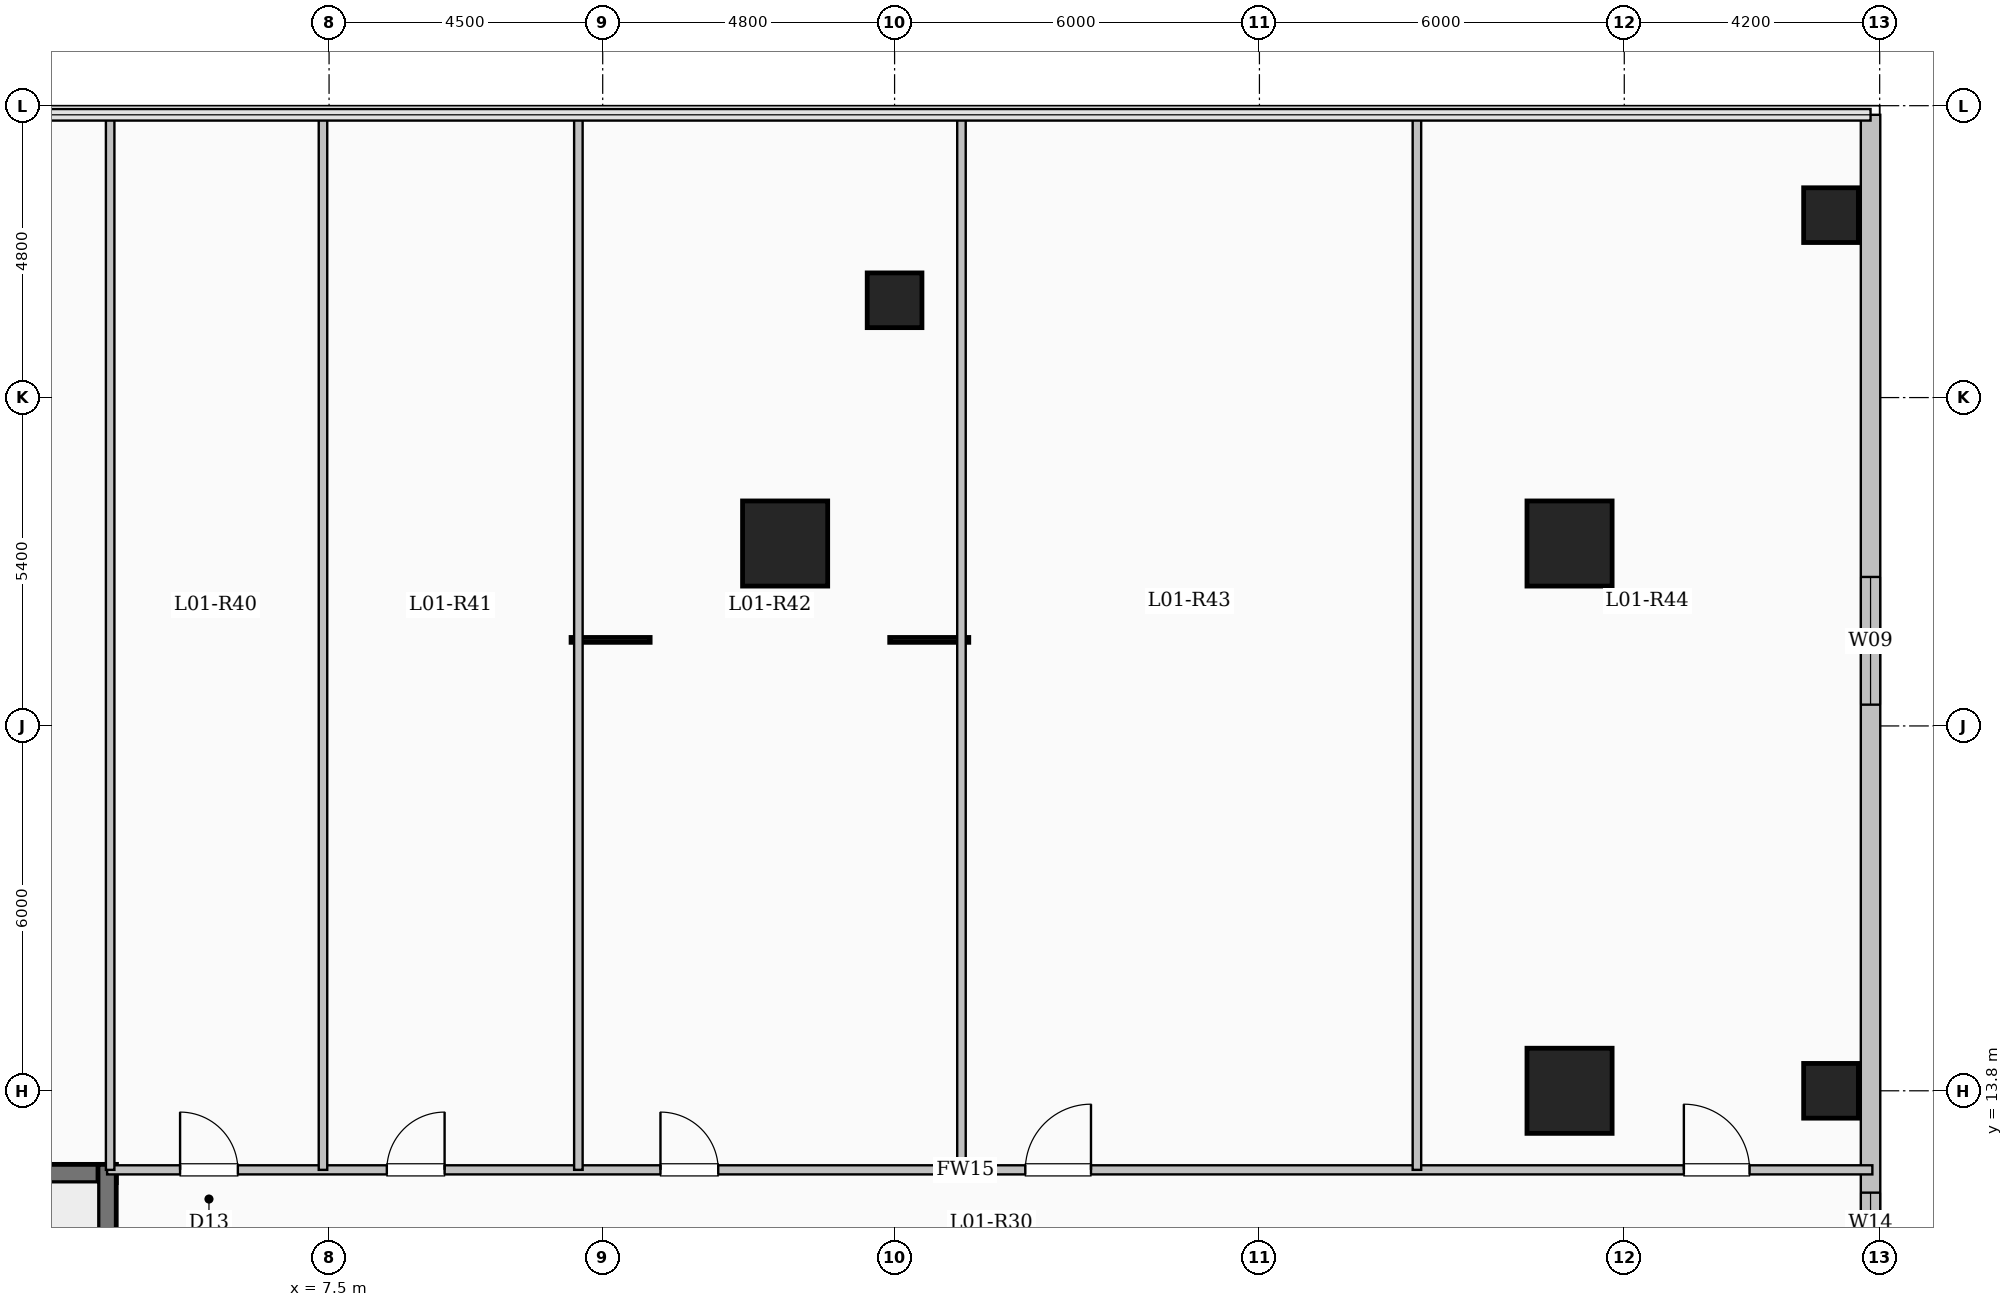
"""IFC4 building model, lengths in metres.
Left out: names, types, materials, properties, quantities, classifications, styles, units other than length and angle.
Written with IfcOpenShell. Run it as: python <this file> out.ifc"""

import sys

from ifc_helpers import new_model, si_unit, direction, frame, frame_2d, origin, origin_2d, place, context, subcontext, project, spatial, rectangle, extrude, element, fill, save


model = new_model("IFC4")
c1 = context("Model", 3, precision=1e-05, world=origin(), true_north=direction((0.0, 1.0)))
c2 = subcontext(c1, "Body", "Model", "MODEL_VIEW")
j1 = project(units=[si_unit("LENGTHUNIT", "METRE"), si_unit("PLANEANGLEUNIT", "RADIAN")], contexts=[c1])
p1 = place(None, origin())
s1 = spatial("IfcSite", under=j1, at=p1, CompositionType="ELEMENT")
p2 = place(p1, origin())
s2 = spatial("IfcBuilding", under=s1, at=p2, CompositionType="ELEMENT")
p3 = place(p2, frame((0.0, 0.0, 5.4)))
s3 = spatial("IfcBuildingStorey", under=s2, at=p3, CompositionType="ELEMENT", Elevation=5.4)
for number, where, z_axis, x_axis in (
    (1, (32.2, 13.8, 0.0), (0.0, 0.0, 1.0), (1.0, 0.0, 0.0)),
    (2, (32.2, 28.2, 0.0), (0.0, 0.0, 1.0), (1.0, 0.0, 0.0)),
):
    element("IfcColumn", number, at=place(p3, frame(where, z_axis=z_axis, x_axis=x_axis)), inside=s3, PredefinedType="COLUMN", context=c2, shape_type="SweptSolid", body=[
        extrude(rectangle(XDim=0.9, YDim=0.9, at=origin_2d()), origin(), (0.0, 0.0, 1.0), 4.28),
    ])
p4 = place(p3, frame((16.8, 26.8, 0.0), z_axis=(0.0, 0.0, 1.0), x_axis=(1.0, 0.0, 0.0)))
e3 = element("IfcColumn", 3, at=p4, inside=s3, PredefinedType="COLUMN", context=c2, shape_type="SweptSolid", body=[
    extrude(rectangle(XDim=0.9, YDim=0.9, at=origin_2d()), origin(), (0.0, 0.0, 1.0), 4.5),
])
for number, where, z_axis, x_axis in (
    (4, (15.0, 22.8, 0.0), (0.0, 0.0, 1.0), (1.0, 0.0, 0.0)),
    (5, (27.9, 22.8, 0.0), (0.0, 0.0, 1.0), (1.0, 0.0, 0.0)),
    (6, (27.9, 13.8, 0.0), (0.0, 0.0, 1.0), (1.0, 0.0, 0.0)),
):
    element("IfcColumn", number, at=place(p3, frame(where, z_axis=z_axis, x_axis=x_axis)), inside=s3, PredefinedType="COLUMN", context=c2, shape_type="SweptSolid", body=[
        extrude(rectangle(XDim=1.4, YDim=1.4, at=origin_2d()), origin(), (0.0, 0.0, 1.0), 4.5),
    ])
p5 = place(p3, frame((32.85, 29.85, 0.0), z_axis=(0.0, 0.0, 1.0), x_axis=(0.0, -1.0, 0.0)))
e7 = element("IfcWall", 7, at=p5, inside=s3, PredefinedType="SOLIDWALL", context=c2, shape_type="SweptSolid", body=[
    extrude(rectangle(XDim=59.7, YDim=0.32, at=frame_2d((29.85, 0.0))), origin(), (0.0, 0.0, 1.0), 4.2),
])
p6 = place(p5, frame((7.6, 0.0, 0.9)))
e8 = element("IfcOpeningElement", 8, at=p6, cuts=e7, PredefinedType="OPENING", context=c2, shape_type="SweptSolid", body=[
    extrude(rectangle(XDim=2.1, YDim=2.0, at=frame_2d((1.05, 1.0))), frame((0.0, 0.17, 0.0), z_axis=(0.0, -1.0, 0.0), x_axis=(1.0, 0.0, 0.0)), (0.0, 0.0, 1.0), 0.34),
])
p7 = place(p5, frame((17.725, 0.0, 0.95)))
e9 = element("IfcOpeningElement", 9, at=p7, cuts=e7, PredefinedType="OPENING", context=c2, shape_type="SweptSolid", body=[
    extrude(rectangle(XDim=1.0, YDim=1.5, at=frame_2d((0.5, 0.75))), frame((0.0, 0.17, 0.0), z_axis=(0.0, -1.0, 0.0), x_axis=(1.0, 0.0, 0.0)), (0.0, 0.0, 1.0), 0.34),
])
p8 = place(p5, frame((27.05, 0.0, 0.9)))
e10 = element("IfcOpeningElement", 10, at=p8, cuts=e7, PredefinedType="OPENING", context=c2, shape_type="SweptSolid", body=[
    extrude(rectangle(XDim=2.1, YDim=2.0, at=frame_2d((1.05, 1.0))), frame((0.0, 0.17, 0.0), z_axis=(0.0, -1.0, 0.0), x_axis=(1.0, 0.0, 0.0)), (0.0, 0.0, 1.0), 0.34),
])
p9 = place(p5, frame((37.758, 0.0, 0.9)))
e11 = element("IfcOpeningElement", 11, at=p9, cuts=e7, PredefinedType="OPENING", context=c2, shape_type="SweptSolid", body=[
    extrude(rectangle(XDim=1.7, YDim=1.9, at=frame_2d((0.85, 0.95))), frame((0.0, 0.17, 0.0), z_axis=(0.0, -1.0, 0.0), x_axis=(1.0, 0.0, 0.0)), (0.0, 0.0, 1.0), 0.34),
])
p10 = place(p3, frame((-4.0, 12.44, 0.0), z_axis=(0.0, 0.0, 1.0), x_axis=(1.0, 0.0, 0.0)))
e12 = element("IfcWall", 12, at=p10, inside=s3, PredefinedType="SHEAR", context=c2, shape_type="SweptSolid", body=[
    extrude(rectangle(XDim=8.0, YDim=0.3, at=frame_2d((4.0, 0.0))), origin(), (0.0, 0.0, 1.0), 4.5),
])
p11 = place(p3, frame((3.85, 9.0, 0.0), z_axis=(0.0, 0.0, 1.0), x_axis=(0.0, 1.0, 0.0)))
e13 = element("IfcWall", 13, at=p11, inside=s3, PredefinedType="SHEAR", context=c2, shape_type="SweptSolid", body=[
    extrude(rectangle(XDim=3.59, YDim=0.3, at=frame_2d((1.795, 0.0))), origin(), (0.0, 0.0, 1.0), 4.5),
])
p12 = place(p3, frame((3.85, 12.5, 0.0), z_axis=(0.0, 0.0, 1.0), x_axis=(1.0, 0.0, 0.0)))
e14 = element("IfcWall", 14, at=p12, inside=s3, PredefinedType="PARTITIONING", context=c2, shape_type="SweptSolid", body=[
    extrude(rectangle(XDim=29.03, YDim=0.15, at=frame_2d((14.515, 0.0))), origin(), (0.0, 0.0, 1.0), 4.2),
])
p13 = place(p12, frame((1.2, 0.0, 0.0)))
e15 = element("IfcOpeningElement", 15, at=p13, cuts=e14, PredefinedType="OPENING", context=c2, shape_type="SweptSolid", body=[
    extrude(rectangle(XDim=0.95, YDim=2.15, at=frame_2d((0.475, 1.075))), frame((0.0, 0.085, 0.0), z_axis=(0.0, -1.0, 0.0), x_axis=(1.0, 0.0, 0.0)), (0.0, 0.0, 1.0), 0.17),
])
p14 = place(p12, frame((4.6, 0.0, 0.0)))
e16 = element("IfcOpeningElement", 16, at=p14, cuts=e14, PredefinedType="OPENING", context=c2, shape_type="SweptSolid", body=[
    extrude(rectangle(XDim=0.95, YDim=2.15, at=frame_2d((0.475, 1.075))), frame((0.0, 0.085, 0.0), z_axis=(0.0, -1.0, 0.0), x_axis=(1.0, 0.0, 0.0)), (0.0, 0.0, 1.0), 0.17),
])
p15 = place(p12, frame((9.1, 0.0, 0.0)))
e17 = element("IfcOpeningElement", 17, at=p15, cuts=e14, PredefinedType="OPENING", context=c2, shape_type="SweptSolid", body=[
    extrude(rectangle(XDim=0.95, YDim=2.15, at=frame_2d((0.475, 1.075))), frame((0.0, 0.085, 0.0), z_axis=(0.0, -1.0, 0.0), x_axis=(1.0, 0.0, 0.0)), (0.0, 0.0, 1.0), 0.17),
])
p16 = place(p12, frame((15.1, 0.0, 0.0)))
e18 = element("IfcOpeningElement", 18, at=p16, cuts=e14, PredefinedType="OPENING", context=c2, shape_type="SweptSolid", body=[
    extrude(rectangle(XDim=1.08, YDim=2.15, at=frame_2d((0.54, 1.075))), frame((0.0, 0.085, 0.0), z_axis=(0.0, -1.0, 0.0), x_axis=(1.0, 0.0, 0.0)), (0.0, 0.0, 1.0), 0.17),
])
p17 = place(p12, frame((25.93, 0.0, 0.0)))
e19 = element("IfcOpeningElement", 19, at=p17, cuts=e14, PredefinedType="OPENING", context=c2, shape_type="SweptSolid", body=[
    extrude(rectangle(XDim=1.08, YDim=2.15, at=frame_2d((0.54, 1.075))), frame((0.0, 0.085, 0.0), z_axis=(0.0, -1.0, 0.0), x_axis=(1.0, 0.0, 0.0)), (0.0, 0.0, 1.0), 0.17),
])
for number, where, z_axis, x_axis in (
    (20, (3.9, 12.5, 0.0), (0.0, 0.0, 1.0), (0.0, 1.0, 0.0)),
    (21, (7.4, 12.5, 0.0), (0.0, 0.0, 1.0), (0.0, 1.0, 0.0)),
    (22, (11.6, 12.5, 0.0), (0.0, 0.0, 1.0), (0.0, 1.0, 0.0)),
):
    element("IfcWall", number, at=place(p3, frame(where, z_axis=z_axis, x_axis=x_axis)), inside=s3, PredefinedType="PARTITIONING", context=c2, shape_type="SweptSolid", body=[
        extrude(rectangle(XDim=17.38, YDim=0.14, at=frame_2d((8.69, 0.0))), origin(), (0.0, 0.0, 1.0), 4.2),
    ])
p18 = place(p3, frame((17.9, 12.5, 0.0), z_axis=(0.0, 0.0, 1.0), x_axis=(0.0, 1.0, 0.0)))
e23 = element("IfcWall", 23, at=p18, inside=s3, PredefinedType="PARTITIONING", context=c2, shape_type="SweptSolid", body=[
    extrude(rectangle(XDim=17.38, YDim=0.14, at=frame_2d((8.69, 0.0))), origin(), (0.0, 0.0, 1.0), 3.385),
])
p19 = place(p3, frame((25.39, 12.5, 0.0), z_axis=(0.0, 0.0, 1.0), x_axis=(0.0, 1.0, 0.0)))
e24 = element("IfcWall", 24, at=p19, inside=s3, PredefinedType="PARTITIONING", context=c2, shape_type="SweptSolid", body=[
    extrude(rectangle(XDim=17.38, YDim=0.14, at=frame_2d((8.69, 0.0))), origin(), (0.0, 0.0, 1.0), 4.2),
])
p20 = place(p6, origin())
e25 = element("IfcWindow", 25, at=p20, inside=s3, PartitioningType="SINGLE_PANEL", PredefinedType="WINDOW", context=c2, shape_type="SweptSolid", body=[
    extrude(rectangle(XDim=2.1, YDim=2.0, at=frame_2d((1.05, 1.0))), frame((0.0, 0.03, 0.0), z_axis=(0.0, -1.0, 0.0), x_axis=(1.0, 0.0, 0.0)), (0.0, 0.0, 1.0), 0.06),
])
fill(e8, e25)
p21 = place(p7, origin())
e26 = element("IfcWindow", 26, at=p21, inside=s3, PartitioningType="SINGLE_PANEL", PredefinedType="WINDOW", context=c2, shape_type="SweptSolid", body=[
    extrude(rectangle(XDim=1.0, YDim=1.5, at=frame_2d((0.5, 0.75))), frame((0.0, 0.03, 0.0), z_axis=(0.0, -1.0, 0.0), x_axis=(1.0, 0.0, 0.0)), (0.0, 0.0, 1.0), 0.06),
])
fill(e9, e26)
p22 = place(p13, origin())
e27 = element("IfcDoor", 27, at=p22, inside=s3, OperationType="SINGLE_SWING_LEFT", PredefinedType="DOOR", context=c2, shape_type="SweptSolid", body=[
    extrude(rectangle(XDim=0.95, YDim=2.15, at=frame_2d((0.475, 1.075))), frame((0.0, 0.025, 0.0), z_axis=(0.0, -1.0, 0.0), x_axis=(1.0, 0.0, 0.0)), (0.0, 0.0, 1.0), 0.05),
])
fill(e15, e27)
p23 = place(p14, origin())
e28 = element("IfcDoor", 28, at=p23, inside=s3, OperationType="SINGLE_SWING_RIGHT", PredefinedType="DOOR", context=c2, shape_type="SweptSolid", body=[
    extrude(rectangle(XDim=0.95, YDim=2.15, at=frame_2d((0.475, 1.075))), frame((0.0, 0.025, 0.0), z_axis=(0.0, -1.0, 0.0), x_axis=(1.0, 0.0, 0.0)), (0.0, 0.0, 1.0), 0.05),
])
fill(e16, e28)
p24 = place(p15, origin())
e29 = element("IfcDoor", 29, at=p24, inside=s3, OperationType="SINGLE_SWING_LEFT", PredefinedType="DOOR", context=c2, shape_type="SweptSolid", body=[
    extrude(rectangle(XDim=0.95, YDim=2.15, at=frame_2d((0.475, 1.075))), frame((0.0, 0.025, 0.0), z_axis=(0.0, -1.0, 0.0), x_axis=(1.0, 0.0, 0.0)), (0.0, 0.0, 1.0), 0.05),
])
fill(e17, e29)
p25 = place(p16, origin())
e30 = element("IfcDoor", 30, at=p25, inside=s3, OperationType="SINGLE_SWING_RIGHT", PredefinedType="DOOR", context=c2, shape_type="SweptSolid", body=[
    extrude(rectangle(XDim=1.08, YDim=2.15, at=frame_2d((0.54, 1.075))), frame((0.0, 0.025, 0.0), z_axis=(0.0, -1.0, 0.0), x_axis=(1.0, 0.0, 0.0)), (0.0, 0.0, 1.0), 0.05),
])
fill(e18, e30)
p26 = place(p17, origin())
e31 = element("IfcDoor", 31, at=p26, inside=s3, OperationType="SINGLE_SWING_LEFT", PredefinedType="DOOR", context=c2, shape_type="SweptSolid", body=[
    extrude(rectangle(XDim=1.08, YDim=2.15, at=frame_2d((0.54, 1.075))), frame((0.0, 0.025, 0.0), z_axis=(0.0, -1.0, 0.0), x_axis=(1.0, 0.0, 0.0)), (0.0, 0.0, 1.0), 0.05),
])
fill(e19, e31)
save(model, sys.argv[1])
